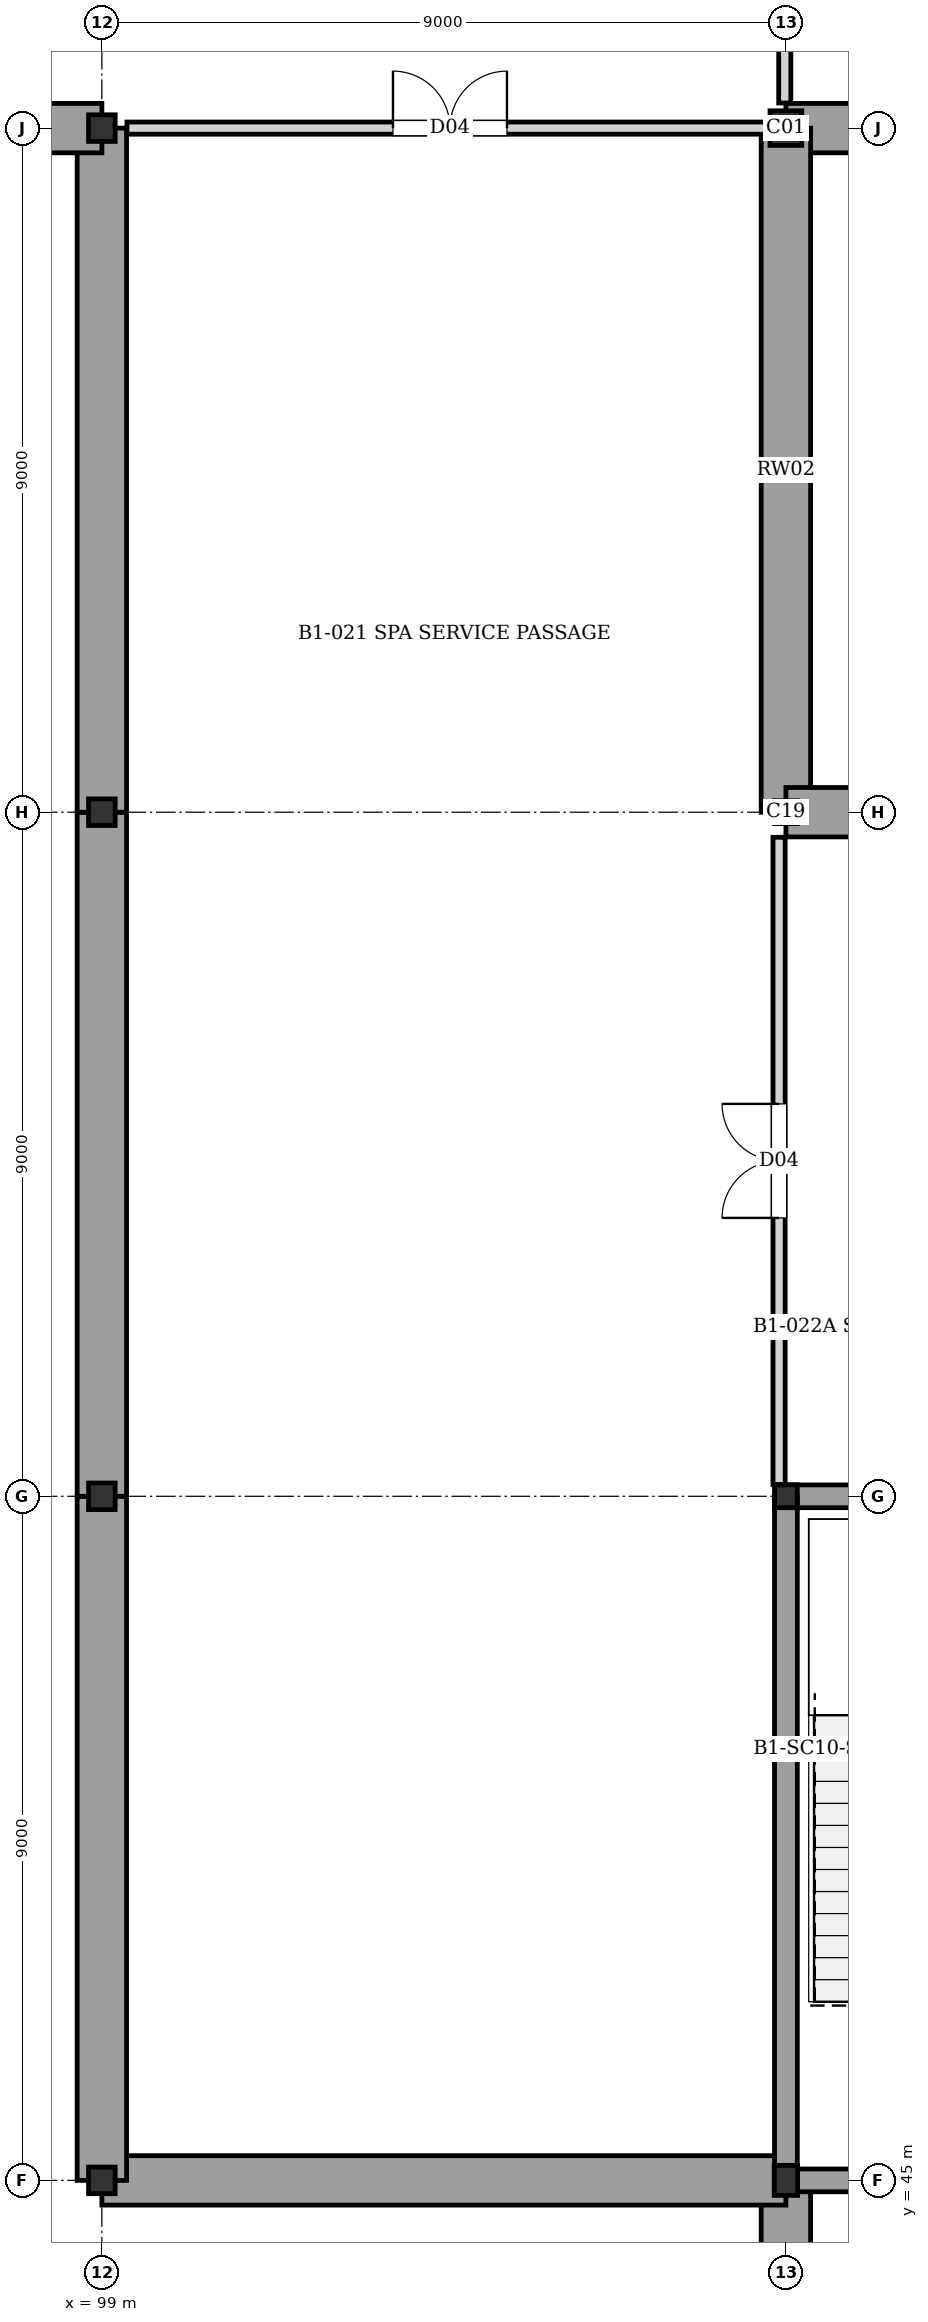
"""IFC4 building model, lengths in metres.
Left out: names, types, materials, properties, quantities, classifications, styles, units other than length and angle.
Written with IfcOpenShell. Run it as: python <this file> out.ifc"""

import sys

from ifc_helpers import new_model, si_unit, direction, frame, frame_2d, origin, origin_2d, place, context, subcontext, project, spatial, rectangle, hollow_rectangle, i_section, extrude, element, fill, save


model = new_model("IFC4")
c1 = context("Model", 3, precision=1e-05, world=origin(), true_north=direction((0.0, 1.0)))
c2 = subcontext(c1, "Body", "Model", "MODEL_VIEW")
j1 = project(units=[si_unit("LENGTHUNIT", "METRE"), si_unit("PLANEANGLEUNIT", "RADIAN")], contexts=[c1])
p1 = place(None, origin())
s1 = spatial("IfcSite", under=j1, at=p1, CompositionType="ELEMENT")
p2 = place(p1, origin())
s2 = spatial("IfcBuilding", under=s1, at=p2, CompositionType="ELEMENT")
p3 = place(p2, frame((0.0, 0.0, -4.48)))
s3 = spatial("IfcBuildingStorey", under=s2, at=p3, CompositionType="ELEMENT", Elevation=-4.48)
for number, where, z_axis, x_axis in (
    (1, (99.0, 45.0, 0.0), (0.0, 0.0, 1.0), (1.0, 0.0, 0.0)),
    (2, (99.0, 54.0, 0.0), (0.0, 0.0, 1.0), (1.0, 0.0, 0.0)),
    (3, (99.0, 63.0, 0.0), (0.0, 0.0, 1.0), (1.0, 0.0, 0.0)),
    (4, (99.0, 72.0, 0.0), (0.0, 0.0, 1.0), (1.0, 0.0, 0.0)),
):
    element("IfcColumn", number, at=place(p3, frame(where, z_axis=z_axis, x_axis=x_axis)), inside=s3, PredefinedType="COLUMN", context=c2, shape_type="SweptSolid", body=[
        extrude(hollow_rectangle(XDim=0.35, YDim=0.35, WallThickness=0.016, at=origin_2d()), origin(), (0.0, 0.0, 1.0), 4.48),
    ])
p4 = place(p3, frame((108.0, 45.0, 0.0), z_axis=(0.0, 0.0, 1.0), x_axis=(1.0, 0.0, 0.0)))
e5 = element("IfcColumn", 5, at=p4, inside=s3, PredefinedType="COLUMN", context=c2, shape_type="SweptSolid", body=[
    extrude(i_section(OverallWidth=0.308, OverallDepth=0.395, WebThickness=0.021, FlangeThickness=0.04, at=origin_2d()), origin(), (0.0, 0.0, 1.0), 4.48),
])
for number, where, z_axis, x_axis in (
    (6, (108.0, 54.0, 0.0), (0.0, 0.0, 1.0), (1.0, 0.0, 0.0)),
    (7, (108.0, 63.0, 0.0), (0.0, 0.0, 1.0), (1.0, 0.0, 0.0)),
):
    element("IfcColumn", number, at=place(p3, frame(where, z_axis=z_axis, x_axis=x_axis)), inside=s3, PredefinedType="COLUMN", context=c2, shape_type="SweptSolid", body=[
        extrude(hollow_rectangle(XDim=0.3, YDim=0.3, WallThickness=0.012, at=origin_2d()), origin(), (0.0, 0.0, 1.0), 4.48),
    ])
p5 = place(p3, frame((108.0, 72.0, 0.0), z_axis=(0.0, 0.0, 1.0), x_axis=(1.0, 0.0, 0.0)))
e8 = element("IfcColumn", 8, at=p5, inside=s3, PredefinedType="COLUMN", context=c2, shape_type="SweptSolid", body=[
    extrude(i_section(OverallWidth=0.418, OverallDepth=0.455, WebThickness=0.032, FlangeThickness=0.056, at=origin_2d()), origin(), (0.0, 0.0, 1.0), 4.48),
])
p6 = place(p3, frame((117.0, 72.0, 0.0), z_axis=(0.0, 0.0, 1.0), x_axis=(-1.0, 0.0, 0.0)))
e9 = element("IfcWall", 9, at=p6, inside=s3, PredefinedType="USERDEFINED", context=c2, shape_type="SweptSolid", body=[
    extrude(rectangle(XDim=9.0, YDim=0.65, at=frame_2d((4.5, 0.0))), origin(), (0.0, 0.0, 1.0), 4.14),
])
for number, where, z_axis, x_axis in (
    (10, (108.0, 72.0, 0.0), (0.0, 0.0, 1.0), (0.0, -1.0, 0.0)),
    (11, (108.0, 63.0, 0.0), (0.0, 0.0, 1.0), (1.0, 0.0, 0.0)),
):
    element("IfcWall", number, at=place(p3, frame(where, z_axis=z_axis, x_axis=x_axis)), inside=s3, PredefinedType="USERDEFINED", context=c2, shape_type="SweptSolid", body=[
        extrude(rectangle(XDim=9.0, YDim=0.65, at=frame_2d((4.5, 0.0))), origin(), (0.0, 0.0, 1.0), 4.03),
    ])
p7 = place(p3, frame((108.0, 36.0, 0.0), z_axis=(0.0, 0.0, 1.0), x_axis=(0.0, 1.0, 0.0)))
e12 = element("IfcWall", 12, at=p7, inside=s3, PredefinedType="USERDEFINED", context=c2, shape_type="SweptSolid", body=[
    extrude(rectangle(XDim=9.0, YDim=0.65, at=frame_2d((4.5, 0.0))), origin(), (0.0, 0.0, 1.0), 4.22),
])
for number, where, z_axis, x_axis in (
    (13, (108.0, 45.0, 0.0), (0.0, 0.0, 1.0), (-1.0, 0.0, 0.0)),
    (14, (99.0, 45.0, 0.0), (0.0, 0.0, 1.0), (0.0, 1.0, 0.0)),
    (15, (99.0, 54.0, 0.0), (0.0, 0.0, 1.0), (0.0, 1.0, 0.0)),
    (16, (99.0, 63.0, 0.0), (0.0, 0.0, 1.0), (0.0, 1.0, 0.0)),
    (17, (99.0, 72.0, 0.0), (0.0, 0.0, 1.0), (-1.0, 0.0, 0.0)),
):
    element("IfcWall", number, at=place(p3, frame(where, z_axis=z_axis, x_axis=x_axis)), inside=s3, PredefinedType="USERDEFINED", context=c2, shape_type="SweptSolid", body=[
        extrude(rectangle(XDim=9.0, YDim=0.65, at=frame_2d((4.5, 0.0))), origin(), (0.0, 0.0, 1.0), 4.03),
    ])
for number, where, z_axis, x_axis in (
    (18, (108.0, 45.0, 0.0), (0.0, 0.0, 1.0), (1.0, 0.0, 0.0)),
    (19, (108.0, 54.0, 0.0), (0.0, 0.0, 1.0), (1.0, 0.0, 0.0)),
    (20, (108.0, 45.0, 0.0), (0.0, 0.0, 1.0), (0.0, 1.0, 0.0)),
):
    element("IfcWall", number, at=place(p3, frame(where, z_axis=z_axis, x_axis=x_axis)), inside=s3, PredefinedType="SHEAR", context=c2, shape_type="SweptSolid", body=[
        extrude(rectangle(XDim=9.0, YDim=0.3, at=frame_2d((4.5, 0.0))), origin(), (0.0, 0.0, 1.0), 4.03),
    ])
p8 = place(p3, frame((107.985, 72.33, 0.0), z_axis=(0.0, 0.0, 1.0), x_axis=(0.0, 1.0, 0.0)))
e21 = element("IfcWall", 21, at=p8, inside=s3, PredefinedType="PARTITIONING", context=c2, shape_type="SweptSolid", body=[
    extrude(rectangle(XDim=8.75, YDim=0.16, at=frame_2d((4.375, 0.0))), origin(), (0.0, 0.0, 1.0), 3.24),
])
p9 = place(p3, frame((99.33, 72.0, 0.0), z_axis=(0.0, 0.0, 1.0), x_axis=(1.0, 0.0, 0.0)))
e22 = element("IfcWall", 22, at=p9, inside=s3, PredefinedType="PARTITIONING", context=c2, shape_type="SweptSolid", body=[
    extrude(rectangle(XDim=8.5, YDim=0.16, at=frame_2d((4.25, 0.0))), origin(), (0.0, 0.0, 1.0), 3.13),
])
p10 = place(p9, frame((3.5, 0.0, 0.0)))
e23 = element("IfcOpeningElement", 23, at=p10, cuts=e22, PredefinedType="OPENING", context=c2, shape_type="SweptSolid", body=[
    extrude(rectangle(XDim=1.5, YDim=2.1, at=frame_2d((0.75, 1.05))), frame((0.0, 0.09, 0.0), z_axis=(0.0, -1.0, 0.0), x_axis=(1.0, 0.0, 0.0)), (0.0, 0.0, 1.0), 0.18),
])
p11 = place(p3, frame((107.91, 54.155, 0.0), z_axis=(0.0, 0.0, 1.0), x_axis=(0.0, 1.0, 0.0)))
e24 = element("IfcWall", 24, at=p11, inside=s3, PredefinedType="PARTITIONING", context=c2, shape_type="SweptSolid", body=[
    extrude(rectangle(XDim=8.515, YDim=0.16, at=frame_2d((4.257, 0.0))), origin(), (0.0, 0.0, 1.0), 3.13),
])
p12 = place(p11, frame((3.508, 0.0, 0.0)))
e25 = element("IfcOpeningElement", 25, at=p12, cuts=e24, PredefinedType="OPENING", context=c2, shape_type="SweptSolid", body=[
    extrude(rectangle(XDim=1.5, YDim=2.1, at=frame_2d((0.75, 1.05))), frame((0.0, 0.09, 0.0), z_axis=(0.0, -1.0, 0.0), x_axis=(1.0, 0.0, 0.0)), (0.0, 0.0, 1.0), 0.18),
])
p13 = place(p10, origin())
e26 = element("IfcDoor", 26, at=p13, inside=s3, OperationType="DOUBLE_DOOR_SINGLE_SWING", PredefinedType="DOOR", context=c2, shape_type="SweptSolid", body=[
    extrude(rectangle(XDim=1.5, YDim=2.1, at=frame_2d((0.75, 1.05))), frame((0.0, 0.025, 0.0), z_axis=(0.0, -1.0, 0.0), x_axis=(1.0, 0.0, 0.0)), (0.0, 0.0, 1.0), 0.05),
])
fill(e23, e26)
p14 = place(p12, origin())
e27 = element("IfcDoor", 27, at=p14, inside=s3, OperationType="DOUBLE_DOOR_SINGLE_SWING", PredefinedType="DOOR", context=c2, shape_type="SweptSolid", body=[
    extrude(rectangle(XDim=1.5, YDim=2.1, at=frame_2d((0.75, 1.05))), frame((0.0, 0.025, 0.0), z_axis=(0.0, -1.0, 0.0), x_axis=(1.0, 0.0, 0.0)), (0.0, 0.0, 1.0), 0.05),
])
fill(e25, e27)
save(model, sys.argv[1])
